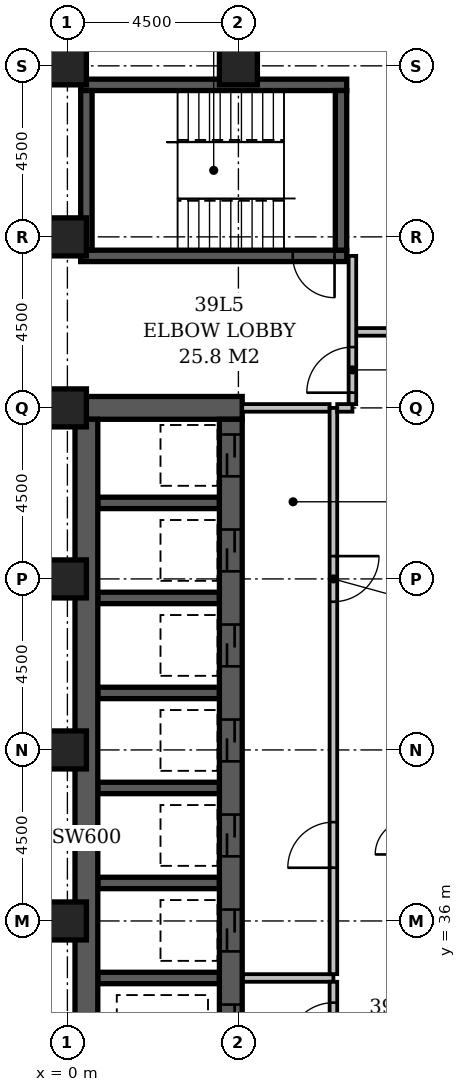
"""IFC4 building model, lengths in metres.
Left out: names, types, materials, properties, quantities, classifications, styles, units other than length and angle.
Written with IfcOpenShell. Run it as: python <this file> out.ifc"""

import sys

from ifc_helpers import new_model, si_unit, direction, frame, frame_2d, origin, origin_2d, place, context, subcontext, project, spatial, rectangle, extrude, element, fill, save


model = new_model("IFC4")
c1 = context("Model", 3, precision=1e-05, world=origin(), true_north=direction((0.0, 1.0)))
c2 = subcontext(c1, "Body", "Model", "MODEL_VIEW")
j1 = project(units=[si_unit("LENGTHUNIT", "METRE"), si_unit("PLANEANGLEUNIT", "RADIAN")], contexts=[c1])
p1 = place(None, origin())
s1 = spatial("IfcSite", under=j1, at=p1, CompositionType="ELEMENT")
p2 = place(p1, origin())
s2 = spatial("IfcBuilding", under=s1, at=p2, CompositionType="ELEMENT")
p3 = place(p2, frame((0.0, 0.0, 155.6)))
s3 = spatial("IfcBuildingStorey", under=s2, at=p3, CompositionType="ELEMENT", Elevation=155.6)
p4 = place(p3, frame((0.2, 49.5, -0.3), z_axis=(0.0, 0.0, 1.0), x_axis=(1.0, 0.0, 0.0)))
e1 = element("IfcWall", 1, at=p4, inside=s3, PredefinedType="SHEAR", context=c2, shape_type="SweptSolid", body=[
    extrude(rectangle(XDim=4.4, YDim=0.6, at=frame_2d((2.2, 0.0))), origin(), (0.0, 0.0, 1.0), 3.6),
])
p5 = place(p3, frame((0.35, 53.5, -0.3), z_axis=(0.0, 0.0, 1.0), x_axis=(1.0, 0.0, 0.0)))
e2 = element("IfcWall", 2, at=p5, inside=s3, PredefinedType="SHEAR", context=c2, shape_type="SweptSolid", body=[
    extrude(rectangle(XDim=7.0, YDim=0.3, at=frame_2d((3.5, 0.0))), origin(), (0.0, 0.0, 1.0), 3.6),
])
p6 = place(p5, frame((5.58, 0.0, 0.3)))
e3 = element("IfcOpeningElement", 3, at=p6, cuts=e2, PredefinedType="OPENING", context=c2, shape_type="SweptSolid", body=[
    extrude(rectangle(XDim=1.1, YDim=2.1, at=frame_2d((0.55, 1.05))), frame((0.0, 0.162, 0.0), z_axis=(0.0, -1.0, 0.0), x_axis=(1.0, 0.0, 0.0)), (0.0, 0.0, 1.0), 0.324),
])
p7 = place(p3, frame((0.35, 58.0, -0.3), z_axis=(0.0, 0.0, 1.0), x_axis=(1.0, 0.0, 0.0)))
e4 = element("IfcWall", 4, at=p7, inside=s3, PredefinedType="SHEAR", context=c2, shape_type="SweptSolid", body=[
    extrude(rectangle(XDim=7.0, YDim=0.3, at=frame_2d((3.5, 0.0))), origin(), (0.0, 0.0, 1.0), 3.6),
])
p8 = place(p3, frame((0.5, 27.15, -0.3), z_axis=(0.0, 0.0, 1.0), x_axis=(0.0, 1.0, 0.0)))
e5 = element("IfcWall", 5, at=p8, inside=s3, PredefinedType="SHEAR", context=c2, shape_type="SweptSolid", body=[
    extrude(rectangle(XDim=22.05, YDim=0.6, at=frame_2d((11.025, 0.0))), origin(), (0.0, 0.0, 1.0), 3.6),
])
p9 = place(p3, frame((0.5, 53.65, -0.3), z_axis=(0.0, 0.0, 1.0), x_axis=(0.0, 1.0, 0.0)))
e6 = element("IfcWall", 6, at=p9, inside=s3, PredefinedType="SHEAR", context=c2, shape_type="SweptSolid", body=[
    extrude(rectangle(XDim=4.2, YDim=0.3, at=frame_2d((2.1, 0.0))), origin(), (0.0, 0.0, 1.0), 3.6),
])
for number, where, z_axis, x_axis in (
    (7, (0.8, 34.5, -0.3), (0.0, 0.0, 1.0), (1.0, 0.0, 0.0)),
    (8, (0.8, 37.0, -0.3), (0.0, 0.0, 1.0), (1.0, 0.0, 0.0)),
    (9, (0.8, 39.5, -0.3), (0.0, 0.0, 1.0), (1.0, 0.0, 0.0)),
    (10, (0.8, 42.0, -0.3), (0.0, 0.0, 1.0), (1.0, 0.0, 0.0)),
    (11, (0.8, 44.5, -0.3), (0.0, 0.0, 1.0), (1.0, 0.0, 0.0)),
    (12, (0.8, 47.0, -0.3), (0.0, 0.0, 1.0), (1.0, 0.0, 0.0)),
):
    element("IfcWall", number, at=place(p3, frame(where, z_axis=z_axis, x_axis=x_axis)), inside=s3, PredefinedType="SHEAR", context=c2, shape_type="SweptSolid", body=[
        extrude(rectangle(XDim=3.2, YDim=0.3, at=frame_2d((1.6, 0.0))), origin(), (0.0, 0.0, 1.0), 3.6),
    ])
p10 = place(p3, frame((4.3, 27.15, -0.3), z_axis=(0.0, 0.0, 1.0), x_axis=(0.0, 1.0, 0.0)))
e13 = element("IfcWall", 13, at=p10, inside=s3, PredefinedType="SHEAR", context=c2, shape_type="SweptSolid", body=[
    extrude(rectangle(XDim=22.05, YDim=0.6, at=frame_2d((11.025, 0.0))), origin(), (0.0, 0.0, 1.0), 3.6),
])
p11 = place(p10, frame((3.05, 0.0, 0.3)))
e14 = element("IfcOpeningElement", 14, at=p11, cuts=e13, PredefinedType="OPENING", context=c2, shape_type="SweptSolid", body=[
    extrude(rectangle(XDim=1.1, YDim=2.1, at=frame_2d((0.55, 1.05))), frame((0.0, 0.312, 0.0), z_axis=(0.0, -1.0, 0.0), x_axis=(1.0, 0.0, 0.0)), (0.0, 0.0, 1.0), 0.624),
])
p12 = place(p10, frame((0.55, 0.0, 0.3)))
e15 = element("IfcOpeningElement", 15, at=p12, cuts=e13, PredefinedType="OPENING", context=c2, shape_type="SweptSolid", body=[
    extrude(rectangle(XDim=1.1, YDim=2.1, at=frame_2d((0.55, 1.05))), frame((0.0, 0.312, 0.0), z_axis=(0.0, -1.0, 0.0), x_axis=(1.0, 0.0, 0.0)), (0.0, 0.0, 1.0), 0.624),
])
p13 = place(p10, frame((20.55, 0.0, 0.3)))
e16 = element("IfcOpeningElement", 16, at=p13, cuts=e13, PredefinedType="OPENING", context=c2, shape_type="SweptSolid", body=[
    extrude(rectangle(XDim=1.1, YDim=2.1, at=frame_2d((0.55, 1.05))), frame((0.0, 0.312, 0.0), z_axis=(0.0, -1.0, 0.0), x_axis=(1.0, 0.0, 0.0)), (0.0, 0.0, 1.0), 0.624),
])
p14 = place(p10, frame((18.05, 0.0, 0.3)))
e17 = element("IfcOpeningElement", 17, at=p14, cuts=e13, PredefinedType="OPENING", context=c2, shape_type="SweptSolid", body=[
    extrude(rectangle(XDim=1.1, YDim=2.1, at=frame_2d((0.55, 1.05))), frame((0.0, 0.312, 0.0), z_axis=(0.0, -1.0, 0.0), x_axis=(1.0, 0.0, 0.0)), (0.0, 0.0, 1.0), 0.624),
])
p15 = place(p10, frame((15.55, 0.0, 0.3)))
e18 = element("IfcOpeningElement", 18, at=p15, cuts=e13, PredefinedType="OPENING", context=c2, shape_type="SweptSolid", body=[
    extrude(rectangle(XDim=1.1, YDim=2.1, at=frame_2d((0.55, 1.05))), frame((0.0, 0.312, 0.0), z_axis=(0.0, -1.0, 0.0), x_axis=(1.0, 0.0, 0.0)), (0.0, 0.0, 1.0), 0.624),
])
p16 = place(p10, frame((13.05, 0.0, 0.3)))
e19 = element("IfcOpeningElement", 19, at=p16, cuts=e13, PredefinedType="OPENING", context=c2, shape_type="SweptSolid", body=[
    extrude(rectangle(XDim=1.1, YDim=2.1, at=frame_2d((0.55, 1.05))), frame((0.0, 0.312, 0.0), z_axis=(0.0, -1.0, 0.0), x_axis=(1.0, 0.0, 0.0)), (0.0, 0.0, 1.0), 0.624),
])
p17 = place(p10, frame((10.55, 0.0, 0.3)))
e20 = element("IfcOpeningElement", 20, at=p17, cuts=e13, PredefinedType="OPENING", context=c2, shape_type="SweptSolid", body=[
    extrude(rectangle(XDim=1.1, YDim=2.1, at=frame_2d((0.55, 1.05))), frame((0.0, 0.312, 0.0), z_axis=(0.0, -1.0, 0.0), x_axis=(1.0, 0.0, 0.0)), (0.0, 0.0, 1.0), 0.624),
])
p18 = place(p10, frame((8.05, 0.0, 0.3)))
e21 = element("IfcOpeningElement", 21, at=p18, cuts=e13, PredefinedType="OPENING", context=c2, shape_type="SweptSolid", body=[
    extrude(rectangle(XDim=1.1, YDim=2.1, at=frame_2d((0.55, 1.05))), frame((0.0, 0.312, 0.0), z_axis=(0.0, -1.0, 0.0), x_axis=(1.0, 0.0, 0.0)), (0.0, 0.0, 1.0), 0.624),
])
p19 = place(p10, frame((5.55, 0.0, 0.3)))
e22 = element("IfcOpeningElement", 22, at=p19, cuts=e13, PredefinedType="OPENING", context=c2, shape_type="SweptSolid", body=[
    extrude(rectangle(XDim=1.1, YDim=2.1, at=frame_2d((0.55, 1.05))), frame((0.0, 0.312, 0.0), z_axis=(0.0, -1.0, 0.0), x_axis=(1.0, 0.0, 0.0)), (0.0, 0.0, 1.0), 0.624),
])
p20 = place(p3, frame((7.2, 53.65, -0.3), z_axis=(0.0, 0.0, 1.0), x_axis=(0.0, 1.0, 0.0)))
e23 = element("IfcWall", 23, at=p20, inside=s3, PredefinedType="SHEAR", context=c2, shape_type="SweptSolid", body=[
    extrude(rectangle(XDim=4.2, YDim=0.3, at=frame_2d((2.1, 0.0))), origin(), (0.0, 0.0, 1.0), 3.6),
])
for number, where, z_axis, x_axis in (
    (24, (0.0, 36.0, -0.3), (0.0, 0.0, 1.0), (1.0, 0.0, 0.0)),
    (25, (0.0, 40.5, -0.3), (0.0, 0.0, 1.0), (1.0, 0.0, 0.0)),
    (26, (0.0, 45.0, -0.3), (0.0, 0.0, 1.0), (1.0, 0.0, 0.0)),
    (27, (0.0, 49.5, -0.3), (0.0, 0.0, 1.0), (1.0, 0.0, 0.0)),
    (28, (0.0, 54.0, -0.3), (0.0, 0.0, 1.0), (1.0, 0.0, 0.0)),
    (29, (0.0, 58.5, -0.3), (0.0, 0.0, 1.0), (1.0, 0.0, 0.0)),
    (30, (4.5, 58.5, -0.3), (0.0, 0.0, 1.0), (1.0, 0.0, 0.0)),
):
    element("IfcColumn", number, at=place(p3, frame(where, z_axis=z_axis, x_axis=x_axis)), inside=s3, PredefinedType="COLUMN", context=c2, shape_type="SweptSolid", body=[
        extrude(rectangle(XDim=1.0, YDim=1.0, at=origin_2d()), origin(), (0.0, 0.0, 1.0), 3.6),
    ])
p21 = place(p3, frame((4.62, 34.5, 0.0), z_axis=(0.0, 0.0, 1.0), x_axis=(1.0, 0.0, 0.0)))
e31 = element("IfcWall", 31, at=p21, inside=s3, PredefinedType="PARTITIONING", context=c2, shape_type="SweptSolid", body=[
    extrude(rectangle(XDim=2.38, YDim=0.2, at=frame_2d((1.19, 0.0))), origin(), (0.0, 0.0, 1.0), 3.3),
])
p22 = place(p3, frame((7.0, 34.6, 0.0), z_axis=(0.0, 0.0, 1.0), x_axis=(0.0, 1.0, 0.0)))
e32 = element("IfcWall", 32, at=p22, inside=s3, PredefinedType="PARTITIONING", context=c2, shape_type="SweptSolid", body=[
    extrude(rectangle(XDim=14.9, YDim=0.2, at=frame_2d((7.45, 0.0))), origin(), (0.0, 0.0, 1.0), 3.3),
])
p23 = place(p22, frame((2.8, 0.0, 0.0)))
e33 = element("IfcOpeningElement", 33, at=p23, cuts=e32, PredefinedType="OPENING", context=c2, shape_type="SweptSolid", body=[
    extrude(rectangle(XDim=1.2, YDim=2.1, at=frame_2d((0.6, 1.05))), frame((0.0, 0.112, 0.0), z_axis=(0.0, -1.0, 0.0), x_axis=(1.0, 0.0, 0.0)), (0.0, 0.0, 1.0), 0.224),
])
p24 = place(p22, frame((9.8, 0.0, 0.0)))
e34 = element("IfcOpeningElement", 34, at=p24, cuts=e32, PredefinedType="OPENING", context=c2, shape_type="SweptSolid", body=[
    extrude(rectangle(XDim=1.2, YDim=2.1, at=frame_2d((0.6, 1.05))), frame((0.0, 0.112, 0.0), z_axis=(0.0, -1.0, 0.0), x_axis=(1.0, 0.0, 0.0)), (0.0, 0.0, 1.0), 0.224),
])
p25 = place(p3, frame((4.6, 49.5, 0.0), z_axis=(0.0, 0.0, 1.0), x_axis=(1.0, 0.0, 0.0)))
e35 = element("IfcWall", 35, at=p25, inside=s3, PredefinedType="PARTITIONING", context=c2, shape_type="SweptSolid", body=[
    extrude(rectangle(XDim=2.3, YDim=0.2, at=frame_2d((1.15, 0.0))), origin(), (0.0, 0.0, 1.0), 3.3),
])
p26 = place(p3, frame((7.0, 32.1, 0.0), z_axis=(0.0, 0.0, 1.0), x_axis=(0.0, 1.0, 0.0)))
e36 = element("IfcWall", 36, at=p26, inside=s3, PredefinedType="PARTITIONING", context=c2, shape_type="SweptSolid", body=[
    extrude(rectangle(XDim=2.3, YDim=0.2, at=frame_2d((1.15, 0.0))), origin(), (0.0, 0.0, 1.0), 3.3),
])
p27 = place(p26, frame((0.55, 0.0, 0.0)))
e37 = element("IfcOpeningElement", 37, at=p27, cuts=e36, PredefinedType="OPENING", context=c2, shape_type="SweptSolid", body=[
    extrude(rectangle(XDim=1.2, YDim=2.1, at=frame_2d((0.6, 1.05))), frame((0.0, 0.112, 0.0), z_axis=(0.0, -1.0, 0.0), x_axis=(1.0, 0.0, 0.0)), (0.0, 0.0, 1.0), 0.224),
])
p28 = place(p3, frame((7.1, 49.5, 0.0), z_axis=(0.0, 0.0, 1.0), x_axis=(1.0, 0.0, 0.0)))
e38 = element("IfcWall", 38, at=p28, inside=s3, PredefinedType="PARTITIONING", context=c2, shape_type="SweptSolid", body=[
    extrude(rectangle(XDim=0.4, YDim=0.2, at=frame_2d((0.2, 0.0))), origin(), (0.0, 0.0, 1.0), 3.3),
])
p29 = place(p3, frame((7.5, 49.6, 0.0), z_axis=(0.0, 0.0, 1.0), x_axis=(0.0, 1.0, 0.0)))
e39 = element("IfcWall", 39, at=p29, inside=s3, PredefinedType="PARTITIONING", context=c2, shape_type="SweptSolid", body=[
    extrude(rectangle(XDim=3.9, YDim=0.2, at=frame_2d((1.95, 0.0))), origin(), (0.0, 0.0, 1.0), 3.3),
])
p30 = place(p29, frame((0.3, 0.0, 0.0)))
e40 = element("IfcOpeningElement", 40, at=p30, cuts=e39, PredefinedType="OPENING", context=c2, shape_type="SweptSolid", body=[
    extrude(rectangle(XDim=1.2, YDim=2.1, at=frame_2d((0.6, 1.05))), frame((0.0, 0.112, 0.0), z_axis=(0.0, -1.0, 0.0), x_axis=(1.0, 0.0, 0.0)), (0.0, 0.0, 1.0), 0.224),
])
p31 = place(p3, frame((7.6, 51.5, 0.0), z_axis=(0.0, 0.0, 1.0), x_axis=(1.0, 0.0, 0.0)))
e41 = element("IfcWall", 41, at=p31, inside=s3, PredefinedType="PARTITIONING", context=c2, shape_type="SweptSolid", body=[
    extrude(rectangle(XDim=15.3, YDim=0.2, at=frame_2d((7.65, 0.0))), origin(), (0.0, 0.0, 1.0), 3.3),
])
p32 = place(p31, frame((2.075, 0.0, 0.0)))
e42 = element("IfcOpeningElement", 42, at=p32, cuts=e41, PredefinedType="OPENING", context=c2, shape_type="SweptSolid", body=[
    extrude(rectangle(XDim=1.0, YDim=2.1, at=frame_2d((0.5, 1.05))), frame((0.0, 0.112, 0.0), z_axis=(0.0, -1.0, 0.0), x_axis=(1.0, 0.0, 0.0)), (0.0, 0.0, 1.0), 0.224),
])
p33 = place(p31, frame((7.6, 0.0, 0.0)))
e43 = element("IfcOpeningElement", 43, at=p33, cuts=e41, PredefinedType="OPENING", context=c2, shape_type="SweptSolid", body=[
    extrude(rectangle(XDim=1.0, YDim=2.1, at=frame_2d((0.5, 1.05))), frame((0.0, 0.112, 0.0), z_axis=(0.0, -1.0, 0.0), x_axis=(1.0, 0.0, 0.0)), (0.0, 0.0, 1.0), 0.224),
])
p34 = place(p31, frame((12.725, 0.0, 0.0)))
e44 = element("IfcOpeningElement", 44, at=p34, cuts=e41, PredefinedType="OPENING", context=c2, shape_type="SweptSolid", body=[
    extrude(rectangle(XDim=0.9, YDim=2.1, at=frame_2d((0.45, 1.05))), frame((0.0, 0.112, 0.0), z_axis=(0.0, -1.0, 0.0), x_axis=(1.0, 0.0, 0.0)), (0.0, 0.0, 1.0), 0.224),
])
p35 = place(p30, origin())
e45 = element("IfcDoor", 45, at=p35, inside=s3, OperationType="SINGLE_SWING_LEFT", PredefinedType="DOOR", context=c2, shape_type="SweptSolid", body=[
    extrude(rectangle(XDim=1.2, YDim=2.1, at=frame_2d((0.6, 1.05))), frame((0.0, 0.025, 0.0), z_axis=(0.0, -1.0, 0.0), x_axis=(1.0, 0.0, 0.0)), (0.0, 0.0, 1.0), 0.05),
])
fill(e40, e45)
p36 = place(p13, origin())
e46 = element("IfcDoor", 46, at=p36, inside=s3, OperationType="SLIDING_TO_LEFT", PredefinedType="DOOR", context=c2, shape_type="SweptSolid", body=[
    extrude(rectangle(XDim=1.1, YDim=2.1, at=frame_2d((0.55, 1.05))), frame((0.0, 0.025, 0.0), z_axis=(0.0, -1.0, 0.0), x_axis=(1.0, 0.0, 0.0)), (0.0, 0.0, 1.0), 0.05),
])
fill(e16, e46)
p37 = place(p14, origin())
e47 = element("IfcDoor", 47, at=p37, inside=s3, OperationType="SLIDING_TO_LEFT", PredefinedType="DOOR", context=c2, shape_type="SweptSolid", body=[
    extrude(rectangle(XDim=1.1, YDim=2.1, at=frame_2d((0.55, 1.05))), frame((0.0, 0.025, 0.0), z_axis=(0.0, -1.0, 0.0), x_axis=(1.0, 0.0, 0.0)), (0.0, 0.0, 1.0), 0.05),
])
fill(e17, e47)
p38 = place(p15, origin())
e48 = element("IfcDoor", 48, at=p38, inside=s3, OperationType="SLIDING_TO_LEFT", PredefinedType="DOOR", context=c2, shape_type="SweptSolid", body=[
    extrude(rectangle(XDim=1.1, YDim=2.1, at=frame_2d((0.55, 1.05))), frame((0.0, 0.025, 0.0), z_axis=(0.0, -1.0, 0.0), x_axis=(1.0, 0.0, 0.0)), (0.0, 0.0, 1.0), 0.05),
])
fill(e18, e48)
p39 = place(p16, origin())
e49 = element("IfcDoor", 49, at=p39, inside=s3, OperationType="SLIDING_TO_LEFT", PredefinedType="DOOR", context=c2, shape_type="SweptSolid", body=[
    extrude(rectangle(XDim=1.1, YDim=2.1, at=frame_2d((0.55, 1.05))), frame((0.0, 0.025, 0.0), z_axis=(0.0, -1.0, 0.0), x_axis=(1.0, 0.0, 0.0)), (0.0, 0.0, 1.0), 0.05),
])
fill(e19, e49)
p40 = place(p17, origin())
e50 = element("IfcDoor", 50, at=p40, inside=s3, OperationType="SLIDING_TO_LEFT", PredefinedType="DOOR", context=c2, shape_type="SweptSolid", body=[
    extrude(rectangle(XDim=1.1, YDim=2.1, at=frame_2d((0.55, 1.05))), frame((0.0, 0.025, 0.0), z_axis=(0.0, -1.0, 0.0), x_axis=(1.0, 0.0, 0.0)), (0.0, 0.0, 1.0), 0.05),
])
fill(e20, e50)
p41 = place(p18, origin())
e51 = element("IfcDoor", 51, at=p41, inside=s3, OperationType="SLIDING_TO_LEFT", PredefinedType="DOOR", context=c2, shape_type="SweptSolid", body=[
    extrude(rectangle(XDim=1.1, YDim=2.1, at=frame_2d((0.55, 1.05))), frame((0.0, 0.025, 0.0), z_axis=(0.0, -1.0, 0.0), x_axis=(1.0, 0.0, 0.0)), (0.0, 0.0, 1.0), 0.05),
])
fill(e21, e51)
p42 = place(p23, origin())
e52 = element("IfcDoor", 52, at=p42, inside=s3, OperationType="SINGLE_SWING_LEFT", PredefinedType="DOOR", context=c2, shape_type="SweptSolid", body=[
    extrude(rectangle(XDim=1.2, YDim=2.1, at=frame_2d((0.6, 1.05))), frame((0.0, 0.025, 0.0), z_axis=(0.0, -1.0, 0.0), x_axis=(1.0, 0.0, 0.0)), (0.0, 0.0, 1.0), 0.05),
])
fill(e33, e52)
p43 = place(p24, origin())
e53 = element("IfcDoor", 53, at=p43, inside=s3, OperationType="SINGLE_SWING_RIGHT", PredefinedType="DOOR", context=c2, shape_type="SweptSolid", body=[
    extrude(rectangle(XDim=1.2, YDim=2.1, at=frame_2d((0.6, 1.05))), frame((0.0, 0.025, 0.0), z_axis=(0.0, -1.0, 0.0), x_axis=(1.0, 0.0, 0.0)), (0.0, 0.0, 1.0), 0.05),
])
fill(e34, e53)
p44 = place(p27, origin())
e54 = element("IfcDoor", 54, at=p44, inside=s3, OperationType="SINGLE_SWING_LEFT", PredefinedType="DOOR", context=c2, shape_type="SweptSolid", body=[
    extrude(rectangle(XDim=1.2, YDim=2.1, at=frame_2d((0.6, 1.05))), frame((0.0, 0.025, 0.0), z_axis=(0.0, -1.0, 0.0), x_axis=(1.0, 0.0, 0.0)), (0.0, 0.0, 1.0), 0.05),
])
fill(e37, e54)
p45 = place(p19, origin())
e55 = element("IfcDoor", 55, at=p45, inside=s3, OperationType="SLIDING_TO_LEFT", PredefinedType="DOOR", context=c2, shape_type="SweptSolid", body=[
    extrude(rectangle(XDim=1.1, YDim=2.1, at=frame_2d((0.55, 1.05))), frame((0.0, 0.025, 0.0), z_axis=(0.0, -1.0, 0.0), x_axis=(1.0, 0.0, 0.0)), (0.0, 0.0, 1.0), 0.05),
])
fill(e22, e55)
p46 = place(p6, origin())
e56 = element("IfcDoor", 56, at=p46, inside=s3, OperationType="SINGLE_SWING_RIGHT", PredefinedType="DOOR", context=c2, shape_type="SweptSolid", body=[
    extrude(rectangle(XDim=1.1, YDim=2.1, at=frame_2d((0.55, 1.05))), frame((0.0, 0.025, 0.0), z_axis=(0.0, -1.0, 0.0), x_axis=(1.0, 0.0, 0.0)), (0.0, 0.0, 1.0), 0.05),
])
fill(e3, e56)
save(model, sys.argv[1])
